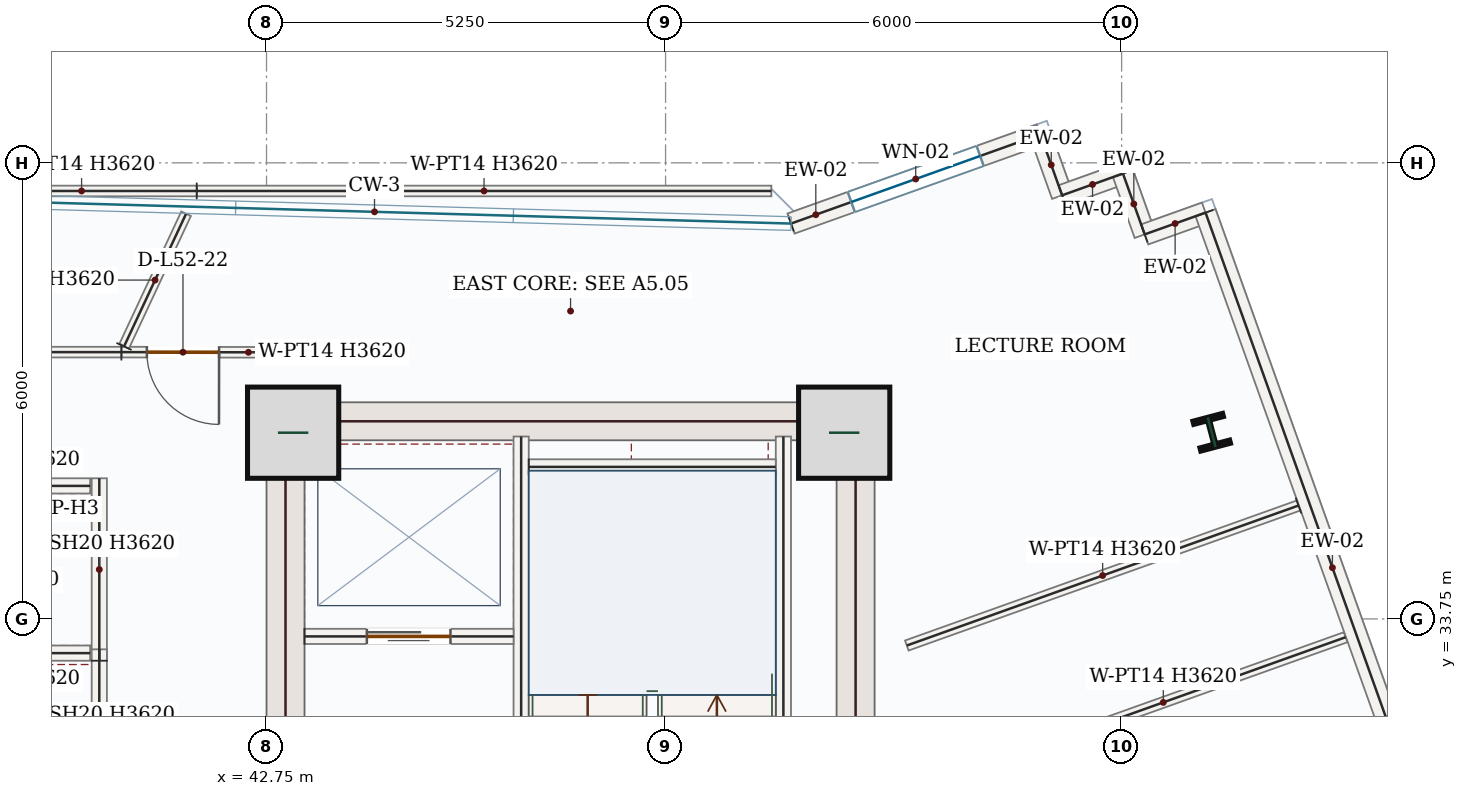
"""IFC4 building model, lengths in metres.
Left out: names, types, materials, properties, quantities, classifications, styles, units other than length and angle.
Written with IfcOpenShell. Run it as: python <this file> out.ifc"""

import sys

from ifc_helpers import new_model, si_unit, direction, frame, frame_2d, origin, origin_2d, place, context, subcontext, project, spatial, rectangle, i_section, extrude, source, transform, mapped, element, fill, save


model = new_model("IFC4")
c1 = context("Model", 3, precision=1e-05, world=origin(), true_north=direction((0.0, 1.0)))
c2 = subcontext(c1, "Body", "Model", "MODEL_VIEW")
j1 = project(units=[si_unit("LENGTHUNIT", "METRE"), si_unit("PLANEANGLEUNIT", "RADIAN")], contexts=[c1])
p1 = place(None, origin())
s1 = spatial("IfcSite", under=j1, at=p1, CompositionType="ELEMENT")
p2 = place(p1, origin())
s2 = spatial("IfcBuilding", under=s1, at=p2, CompositionType="ELEMENT")
p3 = place(p2, frame((0.0, 0.0, 221.4)))
s3 = spatial("IfcBuildingStorey", under=s2, at=p3, CompositionType="ELEMENT", Elevation=221.4)
p4 = place(p3, frame((43.0, 28.05, 0.0), z_axis=(0.0, 0.0, 1.0), x_axis=(0.0, 1.0, 0.0)))
e1 = element("IfcWall", 1, at=p4, inside=s3, PredefinedType="SHEAR", context=c2, shape_type="SweptSolid", body=[
    extrude(rectangle(XDim=8.55, YDim=0.5, at=frame_2d((4.275, 0.0))), origin(), (0.0, 0.0, 1.0), 3.62),
])
p5 = place(p4, frame((1.5, 0.0, 0.0)))
e2 = element("IfcOpeningElement", 2, at=p5, cuts=e1, PredefinedType="OPENING", context=c2, shape_type="SweptSolid", body=[
    extrude(rectangle(XDim=1.1, YDim=2.2, at=frame_2d((0.55, 1.1))), frame((0.0, 0.26, 0.0), z_axis=(0.0, -1.0, 0.0), x_axis=(1.0, 0.0, 0.0)), (0.0, 0.0, 1.0), 0.52),
])
m1 = source(origin(), c2, "Body", "SweptSolid", [
    extrude(rectangle(XDim=8.55, YDim=0.5, at=frame_2d((4.275, 0.0))), origin(), (0.0, 0.0, 1.0), 3.62),
])
p6 = place(p3, frame((50.5, 28.05, 0.0), z_axis=(0.0, 0.0, 1.0), x_axis=(0.0, 1.0, 0.0)))
e3 = element("IfcWall", 3, at=p6, inside=s3, PredefinedType="SHEAR", context=c2, shape_type="MappedRepresentation", body=[
    mapped(m1, transform((0.0, 0.0, 0.0), x_axis=(1.0, 0.0, 0.0), y_axis=(0.0, 1.0, 0.0), z_axis=(0.0, 0.0, 1.0), scale=1.0)),
])
m2 = source(origin(), c2, "Body", "SweptSolid", [
    extrude(rectangle(XDim=7.0, YDim=0.5, at=frame_2d((3.5, 0.0))), origin(), (0.0, 0.0, 1.0), 3.62),
])
p7 = place(p3, frame((43.25, 36.35, 0.0), z_axis=(0.0, 0.0, 1.0), x_axis=(1.0, 0.0, 0.0)))
e4 = element("IfcWall", 4, at=p7, inside=s3, PredefinedType="SHEAR", context=c2, shape_type="MappedRepresentation", body=[
    mapped(m2, transform((0.0, 0.0, 0.0), x_axis=(1.0, 0.0, 0.0), y_axis=(0.0, 1.0, 0.0), z_axis=(0.0, 0.0, 1.0), scale=1.0)),
])
m3 = source(origin(), c2, "Body", "SweptSolid", [
    extrude(rectangle(XDim=1.2, YDim=1.2, at=origin_2d()), origin(), (0.0, 0.0, 1.0), 3.9),
])
for number, where, z_axis, x_axis in (
    (5, (43.1, 36.2, 0.0), (0.0, 0.0, 1.0), (1.0, 0.0, 0.0)),
    (6, (50.35, 36.2, 0.0), (0.0, 0.0, 1.0), (1.0, 0.0, 0.0)),
):
    element("IfcColumn", number, at=place(p3, frame(where, z_axis=z_axis, x_axis=x_axis)), inside=s3, PredefinedType="COLUMN", context=c2, shape_type="MappedRepresentation", body=[
        mapped(m3, transform((0.0, 0.0, 0.0), x_axis=(1.0, 0.0, 0.0), y_axis=(0.0, 1.0, 0.0), z_axis=(0.0, 0.0, 1.0), scale=1.0)),
    ])
m4 = source(origin(), c2, "Body", "SweptSolid", [
    extrude(i_section(OverallWidth=0.404, OverallDepth=0.407, WebThickness=0.027, FlangeThickness=0.044, FilletRadius=0.018, at=origin_2d()), origin(), (0.0, 0.0, 1.0), 3.9),
])
p8 = place(p3, frame((55.185, 36.206, 0.0), z_axis=(0.0, 0.0, 1.0), x_axis=(0.966823388604, 0.255445757936, 0.0)))
e7 = element("IfcColumn", 7, at=p8, inside=s3, PredefinedType="COLUMN", context=c2, shape_type="MappedRepresentation", body=[
    mapped(m4, transform((0.0, 0.0, 0.0), x_axis=(1.0, 0.0, 0.0), y_axis=(0.0, 1.0, 0.0), z_axis=(0.0, 0.0, 1.0), scale=1.0)),
])
p9 = place(p3, frame((49.651, 38.951, 0.0), z_axis=(0.0, 0.0, 1.0), x_axis=(0.941665776774, 0.336549498368, 0.0)))
e8 = element("IfcWall", 8, at=p9, inside=s3, PredefinedType="SOLIDWALL", context=c2, shape_type="SweptSolid", body=[
    extrude(rectangle(XDim=3.483, YDim=0.28, at=frame_2d((1.742, 0.0))), origin(), (0.0, 0.0, 1.0), 3.62),
])
p10 = place(p9, frame((0.842, 0.0, 0.85)))
e9 = element("IfcOpeningElement", 9, at=p10, cuts=e8, PredefinedType="OPENING", context=c2, shape_type="SweptSolid", body=[
    extrude(rectangle(XDim=1.8, YDim=1.75, at=frame_2d((0.9, 0.875))), frame((0.0, 0.15, 0.0), z_axis=(0.0, -1.0, 0.0), x_axis=(1.0, 0.0, 0.0)), (0.0, 0.0, 1.0), 0.3),
])
m5 = source(origin(), c2, "Body", "SweptSolid", [
    extrude(rectangle(XDim=0.85, YDim=0.28, at=frame_2d((0.425, 0.0))), origin(), (0.0, 0.0, 1.0), 3.62),
])
p11 = place(p3, frame((52.931, 40.124, 0.0), z_axis=(0.0, 0.0, 1.0), x_axis=(0.336481891926, -0.941689936447, 0.0)))
e10 = element("IfcWall", 10, at=p11, inside=s3, PredefinedType="SOLIDWALL", context=c2, shape_type="MappedRepresentation", body=[
    mapped(m5, transform((0.0, 0.0, 0.0), x_axis=(1.0, 0.0, 0.0), y_axis=(0.0, 1.0, 0.0), z_axis=(0.0, 0.0, 1.0), scale=1.0)),
])
m6 = source(origin(), c2, "Body", "SweptSolid", [
    extrude(rectangle(XDim=0.85, YDim=0.28, at=frame_2d((0.425, 0.0))), origin(), (0.0, 0.0, 1.0), 3.62),
])
for number, where, z_axis, x_axis in (
    (11, (53.217, 39.323, 0.0), (0.0, 0.0, 1.0), (0.942, 0.337, 0.0)),
    (12, (54.017, 39.609, 0.0), (0.0, 0.0, 1.0), (0.337, -0.942, 0.0)),
):
    element("IfcWall", number, at=place(p3, frame(where, z_axis=z_axis, x_axis=x_axis)), inside=s3, PredefinedType="SOLIDWALL", context=c2, shape_type="MappedRepresentation", body=[
        mapped(m6, transform((0.0, 0.0, 0.0), x_axis=(1.0, 0.0, 0.0), y_axis=(0.0, 1.0, 0.0), z_axis=(0.0, 0.0, 1.0), scale=1.0)),
    ])
m7 = source(origin(), c2, "Body", "SweptSolid", [
    extrude(rectangle(XDim=0.85, YDim=0.28, at=frame_2d((0.425, 0.0))), origin(), (0.0, 0.0, 1.0), 3.62),
])
p12 = place(p3, frame((54.303, 38.809, 0.0), z_axis=(0.0, 0.0, 1.0), x_axis=(0.941657417713, 0.336572886112, 0.0)))
e13 = element("IfcWall", 13, at=p12, inside=s3, PredefinedType="SOLIDWALL", context=c2, shape_type="MappedRepresentation", body=[
    mapped(m7, transform((0.0, 0.0, 0.0), x_axis=(1.0, 0.0, 0.0), y_axis=(0.0, 1.0, 0.0), z_axis=(0.0, 0.0, 1.0), scale=1.0)),
])
m8 = source(origin(), c2, "Body", "SweptSolid", [
    extrude(rectangle(XDim=9.92, YDim=0.28, at=frame_2d((4.96, 0.0))), origin(), (0.0, 0.0, 1.0), 3.62),
])
p13 = place(p3, frame((55.104, 39.095, 0.0), z_axis=(0.0, 0.0, 1.0), x_axis=(0.336532833412, -0.941671732631, 0.0)))
e14 = element("IfcWall", 14, at=p13, inside=s3, PredefinedType="SOLIDWALL", context=c2, shape_type="MappedRepresentation", body=[
    mapped(m8, transform((0.0, 0.0, 0.0), x_axis=(1.0, 0.0, 0.0), y_axis=(0.0, 1.0, 0.0), z_axis=(0.0, 0.0, 1.0), scale=1.0)),
])
m9 = source(origin(), c2, "Body", "SweptSolid", [
    extrude(rectangle(XDim=7.87, YDim=0.2, at=frame_2d((3.935, 0.0))), origin(), (0.0, 0.0, 1.0), 3.62),
])
p14 = place(p3, frame((49.55, 28.28, 0.0), z_axis=(0.0, 0.0, 1.0), x_axis=(0.0, 1.0, 0.0)))
e15 = element("IfcWall", 15, at=p14, inside=s3, PredefinedType="SOLIDWALL", context=c2, shape_type="MappedRepresentation", body=[
    mapped(m9, transform((0.0, 0.0, 0.0), x_axis=(1.0, 0.0, 0.0), y_axis=(0.0, 1.0, 0.0), z_axis=(0.0, 0.0, 1.0), scale=1.0)),
])
p15 = place(p3, frame((46.1, 28.15, 0.0), z_axis=(0.0, 0.0, 1.0), x_axis=(0.0, 1.0, 0.0)))
e16 = element("IfcWall", 16, at=p15, inside=s3, PredefinedType="SOLIDWALL", context=c2, shape_type="SweptSolid", body=[
    extrude(rectangle(XDim=8.0, YDim=0.2, at=frame_2d((4.0, 0.0))), origin(), (0.0, 0.0, 1.0), 3.62),
])
p16 = place(p15, frame((0.4, 0.0, 0.0)))
e17 = element("IfcOpeningElement", 17, at=p16, cuts=e16, PredefinedType="OPENING", context=c2, shape_type="SweptSolid", body=[
    extrude(rectangle(XDim=1.05, YDim=2.15, at=frame_2d((0.525, 1.075))), frame((0.0, 0.11, 0.0), z_axis=(0.0, -1.0, 0.0), x_axis=(1.0, 0.0, 0.0)), (0.0, 0.0, 1.0), 0.22),
])
m10 = source(origin(), c2, "Body", "SweptSolid", [
    extrude(rectangle(XDim=3.25, YDim=0.2, at=frame_2d((1.625, 0.0))), origin(), (0.0, 0.0, 1.0), 3.62),
])
p17 = place(p3, frame((46.2, 35.75, 0.0), z_axis=(0.0, 0.0, 1.0), x_axis=(1.0, 0.0, 0.0)))
e18 = element("IfcWall", 18, at=p17, inside=s3, PredefinedType="SOLIDWALL", context=c2, shape_type="MappedRepresentation", body=[
    mapped(m10, transform((0.0, 0.0, 0.0), x_axis=(1.0, 0.0, 0.0), y_axis=(0.0, 1.0, 0.0), z_axis=(0.0, 0.0, 1.0), scale=1.0)),
])
p18 = place(p3, frame((43.25, 33.52, 0.0), z_axis=(0.0, 0.0, 1.0), x_axis=(1.0, 0.0, 0.0)))
e19 = element("IfcWall", 19, at=p18, inside=s3, PredefinedType="SOLIDWALL", context=c2, shape_type="SweptSolid", body=[
    extrude(rectangle(XDim=2.75, YDim=0.2, at=frame_2d((1.375, 0.0))), origin(), (0.0, 0.0, 1.0), 3.62),
])
p19 = place(p18, frame((0.82, 0.0, 0.0)))
e20 = element("IfcOpeningElement", 20, at=p19, cuts=e19, PredefinedType="OPENING", context=c2, shape_type="SweptSolid", body=[
    extrude(rectangle(XDim=1.1, YDim=2.15, at=frame_2d((0.55, 1.075))), frame((0.0, 0.11, 0.0), z_axis=(0.0, -1.0, 0.0), x_axis=(1.0, 0.0, 0.0)), (0.0, 0.0, 1.0), 0.22),
])
m11 = source(origin(), c2, "Body", "SweptSolid", [
    extrude(rectangle(XDim=2.4, YDim=0.2, at=frame_2d((1.2, 0.0))), origin(), (0.0, 0.0, 1.0), 3.62),
])
p20 = place(p3, frame((40.55, 33.2, 0.0), z_axis=(0.0, 0.0, 1.0), x_axis=(0.0, 1.0, 0.0)))
e21 = element("IfcWall", 21, at=p20, inside=s3, PredefinedType="SOLIDWALL", context=c2, shape_type="MappedRepresentation", body=[
    mapped(m11, transform((0.0, 0.0, 0.0), x_axis=(1.0, 0.0, 0.0), y_axis=(0.0, 1.0, 0.0), z_axis=(0.0, 0.0, 1.0), scale=1.0)),
])
m12 = source(origin(), c2, "Body", "SweptSolid", [
    extrude(rectangle(XDim=2.26, YDim=0.2, at=frame_2d((1.13, 0.0))), origin(), (0.0, 0.0, 1.0), 3.62),
])
for number, where, z_axis, x_axis in (
    (22, (38.17, 33.3, 0.0), (0.0, 0.0, 1.0), (1.0, 0.0, 0.0)),
    (23, (38.17, 35.5, 0.0), (0.0, 0.0, 1.0), (1.0, 0.0, 0.0)),
):
    element("IfcWall", number, at=place(p3, frame(where, z_axis=z_axis, x_axis=x_axis)), inside=s3, PredefinedType="SOLIDWALL", context=c2, shape_type="MappedRepresentation", body=[
        mapped(m12, transform((0.0, 0.0, 0.0), x_axis=(1.0, 0.0, 0.0), y_axis=(0.0, 1.0, 0.0), z_axis=(0.0, 0.0, 1.0), scale=1.0)),
    ])
p21 = place(p3, frame((40.55, 30.95, 0.0), z_axis=(0.0, 0.0, 1.0), x_axis=(0.0, 1.0, 0.0)))
e24 = element("IfcWall", 24, at=p21, inside=s3, PredefinedType="SOLIDWALL", context=c2, shape_type="MappedRepresentation", body=[
    mapped(m11, transform((0.0, 0.0, 0.0), x_axis=(1.0, 0.0, 0.0), y_axis=(0.0, 1.0, 0.0), z_axis=(0.0, 0.0, 1.0), scale=1.0)),
])
m13 = source(origin(), c2, "Body", "SweptSolid", [
    extrude(rectangle(XDim=5.093, YDim=0.14, at=frame_2d((2.547, 0.0))), origin(), (0.0, 0.0, 1.0), 3.62),
])
p22 = place(p3, frame((52.15, 31.795, 0.0), z_axis=(0.0, 0.0, 1.0), x_axis=(0.941667058904, 0.336545910947, 0.0)))
e25 = element("IfcWall", 25, at=p22, inside=s3, PredefinedType="PARTITIONING", context=c2, shape_type="MappedRepresentation", body=[
    mapped(m13, transform((0.0, 0.0, 0.0), x_axis=(1.0, 0.0, 0.0), y_axis=(0.0, 1.0, 0.0), z_axis=(0.0, 0.0, 1.0), scale=1.0)),
])
p23 = place(p3, frame((42.748, 37.257, 0.0), z_axis=(0.0, 0.0, 1.0), x_axis=(-0.999999008896, 0.001407908498, 0.0)))
e26 = element("IfcWall", 26, at=p23, inside=s3, PredefinedType="PARTITIONING", context=c2, shape_type="SweptSolid", body=[
    extrude(rectangle(XDim=1.907, YDim=0.14, at=frame_2d((0.954, 0.0))), origin(), (0.0, 0.0, 1.0), 3.62),
])
p24 = place(p23, frame((0.622, 0.0, 0.0)))
e27 = element("IfcOpeningElement", 27, at=p24, cuts=e26, PredefinedType="OPENING", context=c2, shape_type="SweptSolid", body=[
    extrude(rectangle(XDim=0.95, YDim=2.15, at=frame_2d((0.475, 1.075))), frame((0.0, 0.08, 0.0), z_axis=(0.0, -1.0, 0.0), x_axis=(1.0, 0.0, 0.0)), (0.0, 0.0, 1.0), 0.16),
])
m14 = source(origin(), c2, "Body", "SweptSolid", [
    extrude(rectangle(XDim=1.927, YDim=0.14, at=frame_2d((0.963, 0.0))), origin(), (0.0, 0.0, 1.0), 3.62),
])
p25 = place(p3, frame((40.876, 37.335, 0.0), z_axis=(0.0, 0.0, 1.0), x_axis=(0.42364150529, 0.905829937127, 0.0)))
e28 = element("IfcWall", 28, at=p25, inside=s3, PredefinedType="PARTITIONING", context=c2, shape_type="MappedRepresentation", body=[
    mapped(m14, transform((0.0, 0.0, 0.0), x_axis=(1.0, 0.0, 0.0), y_axis=(0.0, 1.0, 0.0), z_axis=(0.0, 0.0, 1.0), scale=1.0)),
])
m15 = source(origin(), c2, "Body", "SweptSolid", [
    extrude(rectangle(XDim=7.56, YDim=0.14, at=frame_2d((3.78, 0.0))), origin(), (0.0, 0.0, 1.0), 3.62),
])
p26 = place(p3, frame((41.832, 39.38, 0.0), z_axis=(0.0, 0.0, 1.0), x_axis=(1.0, 0.0, 0.0)))
e29 = element("IfcWall", 29, at=p26, inside=s3, PredefinedType="PARTITIONING", context=c2, shape_type="MappedRepresentation", body=[
    mapped(m15, transform((0.0, 0.0, 0.0), x_axis=(1.0, 0.0, 0.0), y_axis=(0.0, 1.0, 0.0), z_axis=(0.0, 0.0, 1.0), scale=1.0)),
])
m16 = source(origin(), c2, "Body", "SweptSolid", [
    extrude(rectangle(XDim=5.473, YDim=0.14, at=frame_2d((2.736, 0.0))), origin(), (0.0, 0.0, 1.0), 3.62),
])
p27 = place(p3, frame((56.327, 35.242, 0.0), z_axis=(0.0, 0.0, 1.0), x_axis=(-0.941665179086, -0.336551170695, 0.0)))
e30 = element("IfcWall", 30, at=p27, inside=s3, PredefinedType="PARTITIONING", context=c2, shape_type="MappedRepresentation", body=[
    mapped(m16, transform((0.0, 0.0, 0.0), x_axis=(1.0, 0.0, 0.0), y_axis=(0.0, 1.0, 0.0), z_axis=(0.0, 0.0, 1.0), scale=1.0)),
])
p28 = place(p3, frame((40.841, 37.26, 0.0), z_axis=(0.0, 0.0, 1.0), x_axis=(-1.0, 0.0, 0.0)))
e31 = element("IfcWall", 31, at=p28, inside=s3, PredefinedType="PARTITIONING", context=c2, shape_type="SweptSolid", body=[
    extrude(rectangle(XDim=7.573, YDim=0.14, at=frame_2d((3.787, 0.0))), origin(), (0.0, 0.0, 1.0), 3.62),
])
p29 = place(p28, frame((4.305, 0.0, 0.0)))
e32 = element("IfcOpeningElement", 32, at=p29, cuts=e31, PredefinedType="OPENING", context=c2, shape_type="SweptSolid", body=[
    extrude(rectangle(XDim=0.95, YDim=2.15, at=frame_2d((0.475, 1.075))), frame((0.0, 0.08, 0.0), z_axis=(0.0, -1.0, 0.0), x_axis=(1.0, 0.0, 0.0)), (0.0, 0.0, 1.0), 0.16),
])
m17 = source(origin(), c2, "Body", "SweptSolid", [
    extrude(rectangle(XDim=3.03, YDim=0.14, at=frame_2d((1.515, 0.0))), origin(), (0.0, 0.0, 1.0), 3.62),
])
p30 = place(p3, frame((38.802, 39.38, 0.0), z_axis=(0.0, 0.0, 1.0), x_axis=(1.0, 0.0, 0.0)))
e33 = element("IfcWall", 33, at=p30, inside=s3, PredefinedType="PARTITIONING", context=c2, shape_type="MappedRepresentation", body=[
    mapped(m17, transform((0.0, 0.0, 0.0), x_axis=(1.0, 0.0, 0.0), y_axis=(0.0, 1.0, 0.0), z_axis=(0.0, 0.0, 1.0), scale=1.0)),
])
m18 = source(origin(), c2, "Body", "SweptSolid", [
    extrude(rectangle(XDim=1.8, YDim=1.75, at=frame_2d((0.9, 0.875))), frame((0.0, 0.03, 0.0), z_axis=(0.0, -1.0, 0.0), x_axis=(1.0, 0.0, 0.0)), (0.0, 0.0, 1.0), 0.06),
])
p31 = place(p10, origin())
e34 = element("IfcWindow", 34, at=p31, inside=s3, PartitioningType="DOUBLE_PANEL_VERTICAL", PredefinedType="WINDOW", context=c2, shape_type="MappedRepresentation", body=[
    mapped(m18, transform((0.0, 0.0, 0.0), x_axis=(1.0, 0.0, 0.0), y_axis=(0.0, 1.0, 0.0), z_axis=(0.0, 0.0, 1.0), scale=1.0)),
])
fill(e9, e34)
m19 = source(origin(), c2, "Body", "SweptSolid", [
    extrude(rectangle(XDim=1.1, YDim=2.15, at=frame_2d((0.55, 1.075))), frame((0.0, 0.025, 0.0), z_axis=(0.0, -1.0, 0.0), x_axis=(1.0, 0.0, 0.0)), (0.0, 0.0, 1.0), 0.05),
])
p32 = place(p19, origin())
e35 = element("IfcDoor", 35, at=p32, inside=s3, OperationType="DOUBLE_DOOR_SLIDING", PredefinedType="DOOR", context=c2, shape_type="MappedRepresentation", body=[
    mapped(m19, transform((0.0, 0.0, 0.0), x_axis=(1.0, 0.0, 0.0), y_axis=(0.0, 1.0, 0.0), z_axis=(0.0, 0.0, 1.0), scale=1.0)),
])
fill(e20, e35)
m20 = source(origin(), c2, "Body", "SweptSolid", [
    extrude(rectangle(XDim=0.95, YDim=2.15, at=frame_2d((0.475, 1.075))), frame((0.0, 0.025, 0.0), z_axis=(0.0, -1.0, 0.0), x_axis=(1.0, 0.0, 0.0)), (0.0, 0.0, 1.0), 0.05),
])
p33 = place(p24, origin())
e36 = element("IfcDoor", 36, at=p33, inside=s3, OperationType="SINGLE_SWING_LEFT", PredefinedType="DOOR", context=c2, shape_type="MappedRepresentation", body=[
    mapped(m20, transform((0.0, 0.0, 0.0), x_axis=(1.0, 0.0, 0.0), y_axis=(0.0, 1.0, 0.0), z_axis=(0.0, 0.0, 1.0), scale=1.0)),
])
fill(e27, e36)
save(model, sys.argv[1])
